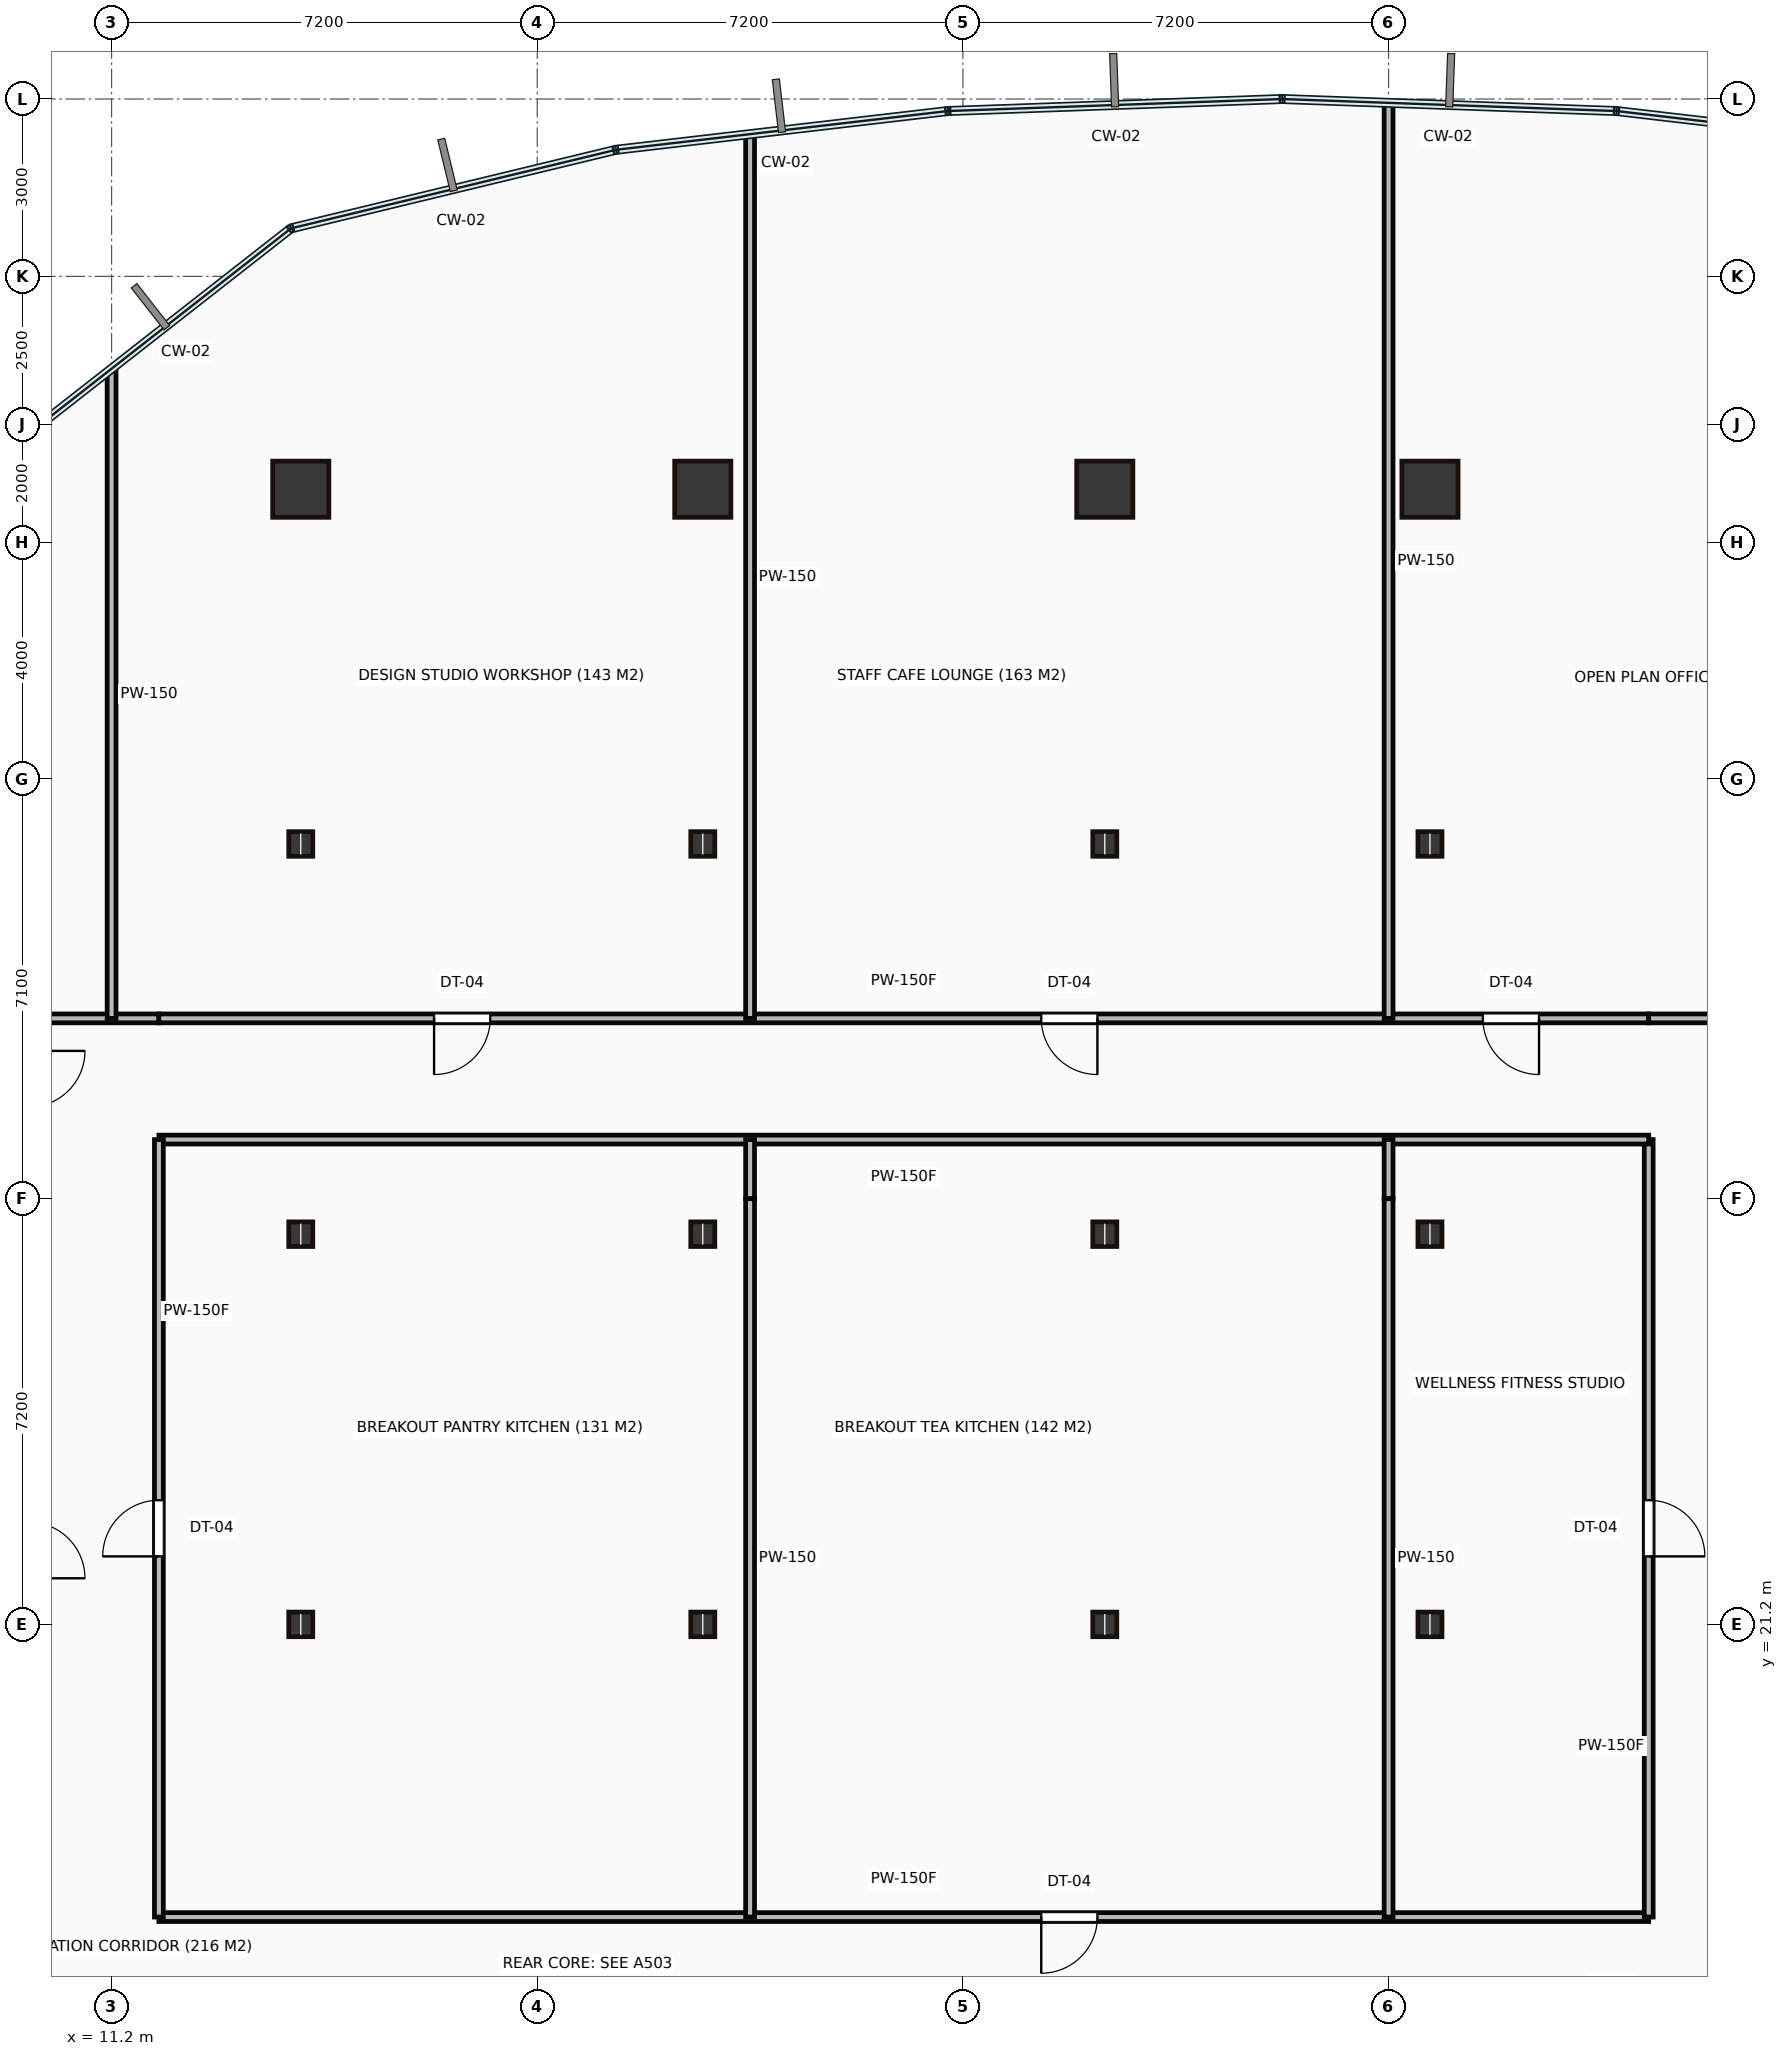
"""IFC4 building model, lengths in metres.
Left out: names, types, materials, properties, quantities, classifications, styles, units other than length and angle.
Written with IfcOpenShell. Run it as: python <this file> out.ifc"""

import sys

from ifc_helpers import new_model, si_unit, direction, frame, frame_2d, origin, origin_2d, place, context, subcontext, project, spatial, rectangle, hollow_rectangle, i_section, extrude, source, transform, mapped, element, fill, save


model = new_model("IFC4")
c1 = context("Model", 3, precision=1e-05, world=origin(), true_north=direction((0.0, 1.0)))
c2 = subcontext(c1, "Body", "Model", "MODEL_VIEW")
j1 = project(units=[si_unit("LENGTHUNIT", "METRE"), si_unit("PLANEANGLEUNIT", "RADIAN")], contexts=[c1])
p1 = place(None, origin())
s1 = spatial("IfcSite", under=j1, at=p1, CompositionType="ELEMENT")
p2 = place(p1, origin())
s2 = spatial("IfcBuilding", under=s1, at=p2, CompositionType="ELEMENT")
p3 = place(p2, frame((0.0, 0.0, 72.65)))
s3 = spatial("IfcBuildingStorey", under=s2, at=p3, CompositionType="ELEMENT", Elevation=72.65)
m1 = source(origin(), c2, "Body", "SweptSolid", [
    extrude(i_section(OverallWidth=0.406, OverallDepth=0.416, WebThickness=0.03, FlangeThickness=0.048, at=origin_2d()), origin(), (0.0, 0.0, 1.0), 3.65),
])
for number, where, z_axis, x_axis in (
    (1, (14.4, 21.2, 0.0), (0.0, 0.0, 1.0), (1.0, 0.0, 0.0)),
    (2, (14.4, 27.8, 0.0), (0.0, 0.0, 1.0), (1.0, 0.0, 0.0)),
    (3, (14.4, 34.4, 0.0), (0.0, 0.0, 1.0), (1.0, 0.0, 0.0)),
):
    element("IfcColumn", number, at=place(p3, frame(where, z_axis=z_axis, x_axis=x_axis)), inside=s3, PredefinedType="COLUMN", context=c2, shape_type="MappedRepresentation", body=[
        mapped(m1, transform((0.0, 0.0, 0.0))),
    ])
m2 = source(origin(), c2, "Body", "SweptSolid", [
    extrude(hollow_rectangle(XDim=0.95, YDim=0.95, WallThickness=0.045, at=origin_2d()), origin(), (0.0, 0.0, 1.0), 3.65),
])
p4 = place(p3, frame((14.4, 40.4, 0.0), z_axis=(0.0, 0.0, 1.0), x_axis=(1.0, 0.0, 0.0)))
e4 = element("IfcColumn", 4, at=p4, inside=s3, PredefinedType="COLUMN", context=c2, shape_type="MappedRepresentation", body=[
    mapped(m2, transform((0.0, 0.0, 0.0))),
])
for number, where, z_axis, x_axis in (
    (5, (21.2, 21.2, 0.0), (0.0, 0.0, 1.0), (1.0, 0.0, 0.0)),
    (6, (21.2, 27.8, 0.0), (0.0, 0.0, 1.0), (1.0, 0.0, 0.0)),
    (7, (21.2, 34.4, 0.0), (0.0, 0.0, 1.0), (1.0, 0.0, 0.0)),
):
    element("IfcColumn", number, at=place(p3, frame(where, z_axis=z_axis, x_axis=x_axis)), inside=s3, PredefinedType="COLUMN", context=c2, shape_type="MappedRepresentation", body=[
        mapped(m1, transform((0.0, 0.0, 0.0))),
    ])
p5 = place(p3, frame((21.2, 40.4, 0.0), z_axis=(0.0, 0.0, 1.0), x_axis=(1.0, 0.0, 0.0)))
e8 = element("IfcColumn", 8, at=p5, inside=s3, PredefinedType="COLUMN", context=c2, shape_type="MappedRepresentation", body=[
    mapped(m2, transform((0.0, 0.0, 0.0))),
])
for number, where, z_axis, x_axis in (
    (9, (28.0, 21.2, 0.0), (0.0, 0.0, 1.0), (1.0, 0.0, 0.0)),
    (10, (28.0, 27.8, 0.0), (0.0, 0.0, 1.0), (1.0, 0.0, 0.0)),
    (11, (28.0, 34.4, 0.0), (0.0, 0.0, 1.0), (1.0, 0.0, 0.0)),
):
    element("IfcColumn", number, at=place(p3, frame(where, z_axis=z_axis, x_axis=x_axis)), inside=s3, PredefinedType="COLUMN", context=c2, shape_type="MappedRepresentation", body=[
        mapped(m1, transform((0.0, 0.0, 0.0))),
    ])
p6 = place(p3, frame((28.0, 40.4, 0.0), z_axis=(0.0, 0.0, 1.0), x_axis=(1.0, 0.0, 0.0)))
e12 = element("IfcColumn", 12, at=p6, inside=s3, PredefinedType="COLUMN", context=c2, shape_type="MappedRepresentation", body=[
    mapped(m2, transform((0.0, 0.0, 0.0))),
])
for number, where, z_axis, x_axis in (
    (13, (33.5, 21.2, 0.0), (0.0, 0.0, 1.0), (1.0, 0.0, 0.0)),
    (14, (33.5, 27.8, 0.0), (0.0, 0.0, 1.0), (1.0, 0.0, 0.0)),
    (15, (33.5, 34.4, 0.0), (0.0, 0.0, 1.0), (1.0, 0.0, 0.0)),
):
    element("IfcColumn", number, at=place(p3, frame(where, z_axis=z_axis, x_axis=x_axis)), inside=s3, PredefinedType="COLUMN", context=c2, shape_type="MappedRepresentation", body=[
        mapped(m1, transform((0.0, 0.0, 0.0))),
    ])
p7 = place(p3, frame((33.5, 40.4, 0.0), z_axis=(0.0, 0.0, 1.0), x_axis=(1.0, 0.0, 0.0)))
e16 = element("IfcColumn", 16, at=p7, inside=s3, PredefinedType="COLUMN", context=c2, shape_type="MappedRepresentation", body=[
    mapped(m2, transform((0.0, 0.0, 0.0))),
])
m3 = source(origin(), c2, "Body", "SweptSolid", [
    extrude(rectangle(XDim=2.2, YDim=0.15, at=frame_2d((1.1, 0.0))), origin(), (0.0, 0.0, 1.0), 3.4),
])
p8 = place(p3, frame((9.8, 31.45, 0.0), z_axis=(0.0, 0.0, 1.0), x_axis=(1.0, 0.0, 0.0)))
e17 = element("IfcWall", 17, at=p8, inside=s3, PredefinedType="PARTITIONING", context=c2, shape_type="MappedRepresentation", body=[
    mapped(m3, transform((0.0, 0.0, 0.0))),
])
m4 = source(origin(), c2, "Body", "SweptSolid", [
    extrude(rectangle(XDim=25.2, YDim=0.15, at=frame_2d((12.6, 0.0))), origin(), (0.0, 0.0, 1.0), 3.4),
])
p9 = place(p3, frame((12.0, 31.45, 0.0), z_axis=(0.0, 0.0, 1.0), x_axis=(1.0, 0.0, 0.0)))
e18 = element("IfcWall", 18, at=p9, inside=s3, PredefinedType="PARTITIONING", context=c2, shape_type="MappedRepresentation", body=[
    mapped(m4, transform((0.0, 0.0, 0.0))),
])
p10 = place(p9, frame((4.655, 0.0, 0.0)))
e19 = element("IfcOpeningElement", 19, at=p10, cuts=e18, PredefinedType="OPENING", context=c2, shape_type="SweptSolid", body=[
    extrude(rectangle(XDim=0.95, YDim=2.15, at=frame_2d((0.475, 1.075))), frame((0.0, 0.085, 0.0), z_axis=(0.0, -1.0, 0.0), x_axis=(1.0, 0.0, 0.0)), (0.0, 0.0, 1.0), 0.17),
])
p11 = place(p9, frame((14.925, 0.0, 0.0)))
e20 = element("IfcOpeningElement", 20, at=p11, cuts=e18, PredefinedType="OPENING", context=c2, shape_type="SweptSolid", body=[
    extrude(rectangle(XDim=0.95, YDim=2.15, at=frame_2d((0.475, 1.075))), frame((0.0, 0.085, 0.0), z_axis=(0.0, -1.0, 0.0), x_axis=(1.0, 0.0, 0.0)), (0.0, 0.0, 1.0), 0.17),
])
p12 = place(p9, frame((22.395, 0.0, 0.0)))
e21 = element("IfcOpeningElement", 21, at=p12, cuts=e18, PredefinedType="OPENING", context=c2, shape_type="SweptSolid", body=[
    extrude(rectangle(XDim=0.95, YDim=2.15, at=frame_2d((0.475, 1.075))), frame((0.0, 0.085, 0.0), z_axis=(0.0, -1.0, 0.0), x_axis=(1.0, 0.0, 0.0)), (0.0, 0.0, 1.0), 0.17),
])
p13 = place(p3, frame((37.2, 31.45, 0.0), z_axis=(0.0, 0.0, 1.0), x_axis=(1.0, 0.0, 0.0)))
e22 = element("IfcWall", 22, at=p13, inside=s3, PredefinedType="PARTITIONING", context=c2, shape_type="MappedRepresentation", body=[
    mapped(m3, transform((0.0, 0.0, 0.0))),
])
p14 = place(p3, frame((12.0, 16.25, 0.0), z_axis=(0.0, 0.0, 1.0), x_axis=(1.0, 0.0, 0.0)))
e23 = element("IfcWall", 23, at=p14, inside=s3, PredefinedType="PARTITIONING", context=c2, shape_type="MappedRepresentation", body=[
    mapped(m4, transform((0.0, 0.0, 0.0))),
])
p15 = place(p14, frame((14.925, 0.0, 0.0)))
e24 = element("IfcOpeningElement", 24, at=p15, cuts=e23, PredefinedType="OPENING", context=c2, shape_type="SweptSolid", body=[
    extrude(rectangle(XDim=0.95, YDim=2.15, at=frame_2d((0.475, 1.075))), frame((0.0, 0.085, 0.0), z_axis=(0.0, -1.0, 0.0), x_axis=(1.0, 0.0, 0.0)), (0.0, 0.0, 1.0), 0.17),
])
m5 = source(origin(), c2, "Body", "SweptSolid", [
    extrude(rectangle(XDim=13.15, YDim=0.15, at=frame_2d((6.575, 0.0))), origin(), (0.0, 0.0, 1.0), 3.4),
])
p16 = place(p3, frame((37.2, 16.25, 0.0), z_axis=(0.0, 0.0, 1.0), x_axis=(0.0, 1.0, 0.0)))
e25 = element("IfcWall", 25, at=p16, inside=s3, PredefinedType="PARTITIONING", context=c2, shape_type="MappedRepresentation", body=[
    mapped(m5, transform((0.0, 0.0, 0.0))),
])
p17 = place(p16, frame((6.1, 0.0, 0.0)))
e26 = element("IfcOpeningElement", 26, at=p17, cuts=e25, PredefinedType="OPENING", context=c2, shape_type="SweptSolid", body=[
    extrude(rectangle(XDim=0.95, YDim=2.15, at=frame_2d((0.475, 1.075))), frame((0.0, 0.085, 0.0), z_axis=(0.0, -1.0, 0.0), x_axis=(1.0, 0.0, 0.0)), (0.0, 0.0, 1.0), 0.17),
])
p18 = place(p3, frame((37.2, 29.4, 0.0), z_axis=(0.0, 0.0, 1.0), x_axis=(-1.0, 0.0, 0.0)))
e27 = element("IfcWall", 27, at=p18, inside=s3, PredefinedType="PARTITIONING", context=c2, shape_type="MappedRepresentation", body=[
    mapped(m4, transform((0.0, 0.0, 0.0))),
])
p19 = place(p3, frame((12.0, 29.4, 0.0), z_axis=(0.0, 0.0, 1.0), x_axis=(0.0, -1.0, 0.0)))
e28 = element("IfcWall", 28, at=p19, inside=s3, PredefinedType="PARTITIONING", context=c2, shape_type="MappedRepresentation", body=[
    mapped(m5, transform((0.0, 0.0, 0.0))),
])
p20 = place(p19, frame((6.1, 0.0, 0.0)))
e29 = element("IfcOpeningElement", 29, at=p20, cuts=e28, PredefinedType="OPENING", context=c2, shape_type="SweptSolid", body=[
    extrude(rectangle(XDim=0.95, YDim=2.15, at=frame_2d((0.475, 1.075))), frame((0.0, 0.085, 0.0), z_axis=(0.0, -1.0, 0.0), x_axis=(1.0, 0.0, 0.0)), (0.0, 0.0, 1.0), 0.17),
])
m6 = source(origin(), c2, "Body", "SweptSolid", [
    extrude(rectangle(XDim=10.963, YDim=0.15, at=frame_2d((5.482, 0.0))), origin(), (0.0, 0.0, 1.0), 3.4),
])
p21 = place(p3, frame((11.2, 42.413, 0.0), z_axis=(0.0, 0.0, 1.0), x_axis=(0.0, -1.0, 0.0)))
e30 = element("IfcWall", 30, at=p21, inside=s3, PredefinedType="PARTITIONING", context=c2, shape_type="MappedRepresentation", body=[
    mapped(m6, transform((0.0, 0.0, 0.0))),
])
m7 = source(origin(), c2, "Body", "SweptSolid", [
    extrude(rectangle(XDim=1.0, YDim=0.15, at=frame_2d((0.5, 0.0))), origin(), (0.0, 0.0, 1.0), 3.4),
])
p22 = place(p3, frame((22.0, 29.4, 0.0), z_axis=(0.0, 0.0, 1.0), x_axis=(0.0, -1.0, 0.0)))
e31 = element("IfcWall", 31, at=p22, inside=s3, PredefinedType="PARTITIONING", context=c2, shape_type="MappedRepresentation", body=[
    mapped(m7, transform((0.0, 0.0, 0.0))),
])
m8 = source(origin(), c2, "Body", "SweptSolid", [
    extrude(rectangle(XDim=12.15, YDim=0.15, at=frame_2d((6.075, 0.0))), origin(), (0.0, 0.0, 1.0), 3.4),
])
p23 = place(p3, frame((22.0, 28.4, 0.0), z_axis=(0.0, 0.0, 1.0), x_axis=(0.0, -1.0, 0.0)))
e32 = element("IfcWall", 32, at=p23, inside=s3, PredefinedType="PARTITIONING", context=c2, shape_type="MappedRepresentation", body=[
    mapped(m8, transform((0.0, 0.0, 0.0))),
])
m9 = source(origin(), c2, "Body", "SweptSolid", [
    extrude(rectangle(XDim=14.936, YDim=0.15, at=frame_2d((7.468, 0.0))), origin(), (0.0, 0.0, 1.0), 3.4),
])
p24 = place(p3, frame((22.0, 46.386, 0.0), z_axis=(0.0, 0.0, 1.0), x_axis=(0.0, -1.0, 0.0)))
e33 = element("IfcWall", 33, at=p24, inside=s3, PredefinedType="PARTITIONING", context=c2, shape_type="MappedRepresentation", body=[
    mapped(m9, transform((0.0, 0.0, 0.0))),
])
p25 = place(p3, frame((32.8, 29.4, 0.0), z_axis=(0.0, 0.0, 1.0), x_axis=(0.0, -1.0, 0.0)))
e34 = element("IfcWall", 34, at=p25, inside=s3, PredefinedType="PARTITIONING", context=c2, shape_type="MappedRepresentation", body=[
    mapped(m7, transform((0.0, 0.0, 0.0))),
])
p26 = place(p3, frame((32.8, 28.4, 0.0), z_axis=(0.0, 0.0, 1.0), x_axis=(0.0, -1.0, 0.0)))
e35 = element("IfcWall", 35, at=p26, inside=s3, PredefinedType="PARTITIONING", context=c2, shape_type="MappedRepresentation", body=[
    mapped(m8, transform((0.0, 0.0, 0.0))),
])
m10 = source(origin(), c2, "Body", "SweptSolid", [
    extrude(rectangle(XDim=15.465, YDim=0.15, at=frame_2d((7.733, 0.0))), origin(), (0.0, 0.0, 1.0), 3.4),
])
p27 = place(p3, frame((32.8, 46.915, 0.0), z_axis=(0.0, 0.0, 1.0), x_axis=(0.0, -1.0, 0.0)))
e36 = element("IfcWall", 36, at=p27, inside=s3, PredefinedType="PARTITIONING", context=c2, shape_type="MappedRepresentation", body=[
    mapped(m10, transform((0.0, 0.0, 0.0))),
])
m11 = source(origin(), c2, "Body", "SweptSolid", [
    extrude(rectangle(XDim=0.95, YDim=2.15, at=frame_2d((0.475, 1.075))), frame((0.0, 0.025, 0.0), z_axis=(0.0, -1.0, 0.0), x_axis=(1.0, 0.0, 0.0)), (0.0, 0.0, 1.0), 0.05),
])
p28 = place(p10, origin())
e37 = element("IfcDoor", 37, at=p28, inside=s3, OperationType="SINGLE_SWING_LEFT", PredefinedType="DOOR", context=c2, shape_type="MappedRepresentation", body=[
    mapped(m11, transform((0.0, 0.0, 0.0))),
])
fill(e19, e37)
p29 = place(p20, origin())
e38 = element("IfcDoor", 38, at=p29, inside=s3, OperationType="SINGLE_SWING_RIGHT", PredefinedType="DOOR", context=c2, shape_type="MappedRepresentation", body=[
    mapped(m11, transform((0.0, 0.0, 0.0))),
])
fill(e29, e38)
p30 = place(p15, origin())
e39 = element("IfcDoor", 39, at=p30, inside=s3, OperationType="SINGLE_SWING_LEFT", PredefinedType="DOOR", context=c2, shape_type="MappedRepresentation", body=[
    mapped(m11, transform((0.0, 0.0, 0.0))),
])
fill(e24, e39)
p31 = place(p11, origin())
e40 = element("IfcDoor", 40, at=p31, inside=s3, OperationType="SINGLE_SWING_RIGHT", PredefinedType="DOOR", context=c2, shape_type="MappedRepresentation", body=[
    mapped(m11, transform((0.0, 0.0, 0.0))),
])
fill(e20, e40)
p32 = place(p17, origin())
e41 = element("IfcDoor", 41, at=p32, inside=s3, OperationType="SINGLE_SWING_LEFT", PredefinedType="DOOR", context=c2, shape_type="MappedRepresentation", body=[
    mapped(m11, transform((0.0, 0.0, 0.0))),
])
fill(e26, e41)
p33 = place(p12, origin())
e42 = element("IfcDoor", 42, at=p33, inside=s3, OperationType="SINGLE_SWING_RIGHT", PredefinedType="DOOR", context=c2, shape_type="MappedRepresentation", body=[
    mapped(m11, transform((0.0, 0.0, 0.0))),
])
fill(e21, e42)
save(model, sys.argv[1])
